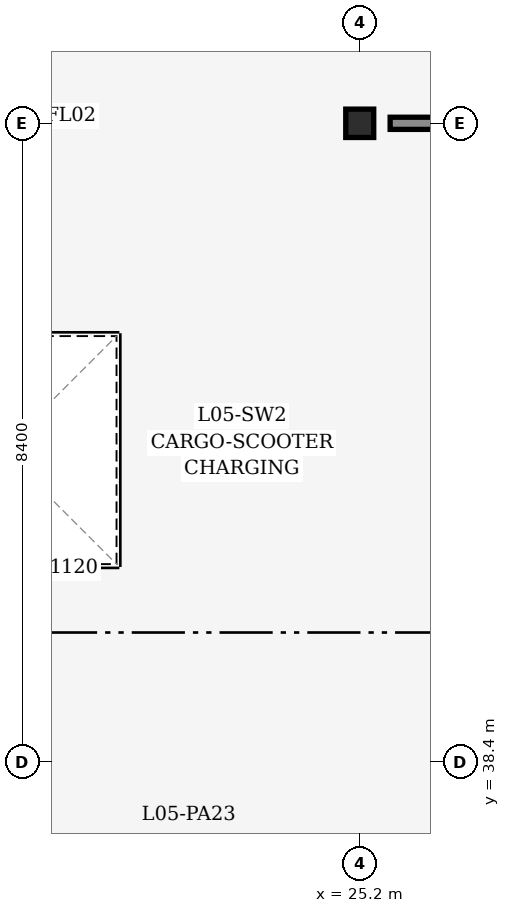
"""IFC4 building model, lengths in metres.
Left out: names, types, materials, properties, quantities, classifications, styles, units other than length and angle.
Written with IfcOpenShell. Run it as: python <this file> out.ifc"""

import sys

from ifc_helpers import new_model, si_unit, direction, frame, frame_2d, origin, origin_2d, place, context, subcontext, project, spatial, rectangle, i_section, extrude, element, save


model = new_model("IFC4")
c1 = context("Model", 3, precision=1e-05, world=origin(), true_north=direction((0.0, 1.0)))
c2 = subcontext(c1, "Body", "Model", "MODEL_VIEW")
j1 = project(units=[si_unit("LENGTHUNIT", "METRE"), si_unit("PLANEANGLEUNIT", "RADIAN")], contexts=[c1])
p1 = place(None, origin())
s1 = spatial("IfcSite", under=j1, at=p1, CompositionType="ELEMENT")
p2 = place(p1, origin())
s2 = spatial("IfcBuilding", under=s1, at=p2, CompositionType="ELEMENT")
p3 = place(p2, frame((0.0, 0.0, 19.8)))
s3 = spatial("IfcBuildingStorey", under=s2, at=p3, CompositionType="ELEMENT", Elevation=19.8)
for number, where, z_axis, x_axis in (
    (1, (25.2, 38.4, 0.0), (0.0, 0.0, 1.0), (1.0, 0.0, 0.0)),
    (2, (25.2, 46.8, 0.0), (0.0, 0.0, 1.0), (1.0, 0.0, 0.0)),
):
    element("IfcColumn", number, at=place(p3, frame(where, z_axis=z_axis, x_axis=x_axis)), inside=s3, PredefinedType="COLUMN", context=c2, shape_type="SweptSolid", body=[
        extrude(i_section(OverallWidth=0.373, OverallDepth=0.368, WebThickness=0.014, FlangeThickness=0.024, FilletRadius=0.015, at=origin_2d()), origin(), (0.0, 0.0, 1.0), 3.6),
    ])
p4 = place(p3, frame((25.6, 46.8, 0.0), z_axis=(0.0, 0.0, 1.0), x_axis=(1.0, 0.0, 0.0)))
e3 = element("IfcWall", 3, at=p4, inside=s3, PredefinedType="PARTITIONING", context=c2, shape_type="SweptSolid", body=[
    extrude(rectangle(XDim=32.8, YDim=0.16, at=frame_2d((16.4, 0.0))), origin(), (0.0, 0.0, 1.0), 2.425),
])
p5 = place(p4, frame((4.0, 0.0, 0.0)))
e4 = element("IfcOpeningElement", 4, at=p5, cuts=e3, PredefinedType="OPENING", context=c2, shape_type="SweptSolid", body=[
    extrude(rectangle(XDim=1.2, YDim=2.15, at=frame_2d((0.6, 1.075))), frame((0.0, 0.09, 0.0), z_axis=(0.0, -1.0, 0.0), x_axis=(1.0, 0.0, 0.0)), (0.0, 0.0, 1.0), 0.18),
])
save(model, sys.argv[1])
